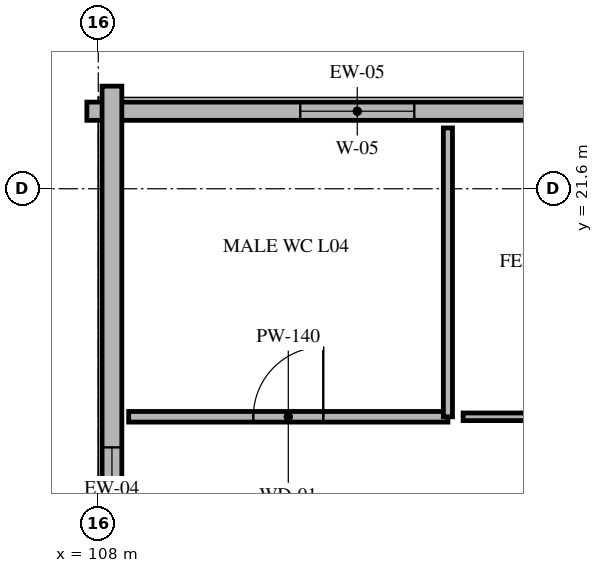
"""IFC4 building model, lengths in metres.
Left out: names, types, materials, properties, quantities, classifications, styles, units other than length and angle.
Written with IfcOpenShell. Run it as: python <this file> out.ifc"""

import sys

from ifc_helpers import new_model, si_unit, direction, frame, frame_2d, origin, place, context, subcontext, project, spatial, rectangle, extrude, element, fill, save


model = new_model("IFC4")
c1 = context("Model", 3, precision=1e-05, world=origin(), true_north=direction((0.0, 1.0)))
c2 = subcontext(c1, "Body", "Model", "MODEL_VIEW")
j1 = project(units=[si_unit("LENGTHUNIT", "METRE"), si_unit("PLANEANGLEUNIT", "RADIAN")], contexts=[c1])
p1 = place(None, origin())
s1 = spatial("IfcSite", under=j1, at=p1, CompositionType="ELEMENT")
p2 = place(p1, origin())
s2 = spatial("IfcBuilding", under=s1, at=p2, CompositionType="ELEMENT")
p3 = place(p2, frame((0.0, 0.0, 16.8)))
s3 = spatial("IfcBuildingStorey", under=s2, at=p3, CompositionType="ELEMENT", Elevation=16.8)
p4 = place(p3, frame((107.85, 22.62, 0.0), z_axis=(0.0, 0.0, 1.0), x_axis=(1.0, 0.0, 0.0)))
e1 = element("IfcWall", 1, at=p4, inside=s3, PredefinedType="SOLIDWALL", context=c2, shape_type="SweptSolid", body=[
    extrude(rectangle(XDim=7.115, YDim=0.24, at=frame_2d((3.558, 0.0))), origin(), (0.0, 0.0, 1.0), 3.68),
])
p5 = place(p4, frame((2.808, 0.0, 0.9)))
e2 = element("IfcOpeningElement", 2, at=p5, cuts=e1, PredefinedType="OPENING", context=c2, shape_type="SweptSolid", body=[
    extrude(rectangle(XDim=1.5, YDim=1.2, at=frame_2d((0.75, 0.6))), frame((0.0, 0.13, 0.0), z_axis=(0.0, -1.0, 0.0), x_axis=(1.0, 0.0, 0.0)), (0.0, 0.0, 1.0), 0.26),
])
p6 = place(p3, frame((108.18, 11.346, 0.0), z_axis=(0.0, 0.0, 1.0), x_axis=(0.0, 1.0, 0.0)))
e3 = element("IfcWall", 3, at=p6, inside=s3, PredefinedType="SOLIDWALL", context=c2, shape_type="SweptSolid", body=[
    extrude(rectangle(XDim=11.604, YDim=0.26, at=frame_2d((5.802, 0.0))), origin(), (0.0, 0.0, 1.0), 3.68),
])
p7 = place(p6, frame((4.752, 0.0, 0.9)))
e4 = element("IfcOpeningElement", 4, at=p7, cuts=e3, PredefinedType="OPENING", context=c2, shape_type="SweptSolid", body=[
    extrude(rectangle(XDim=2.1, YDim=1.35, at=frame_2d((1.05, 0.675))), frame((0.0, 0.14, 0.0), z_axis=(0.0, -1.0, 0.0), x_axis=(1.0, 0.0, 0.0)), (0.0, 0.0, 1.0), 0.28),
])
p8 = place(p3, frame((108.4, 18.6, 0.0), z_axis=(0.0, 0.0, 1.0), x_axis=(1.0, 0.0, 0.0)))
e5 = element("IfcWall", 5, at=p8, inside=s3, PredefinedType="PARTITIONING", context=c2, shape_type="SweptSolid", body=[
    extrude(rectangle(XDim=4.2, YDim=0.14, at=frame_2d((2.1, 0.0))), origin(), (0.0, 0.0, 1.0), 3.68),
])
p9 = place(p8, frame((1.64, 0.0, 0.0)))
e6 = element("IfcOpeningElement", 6, at=p9, cuts=e5, PredefinedType="OPENING", context=c2, shape_type="SweptSolid", body=[
    extrude(rectangle(XDim=0.92, YDim=2.1, at=frame_2d((0.46, 1.05))), frame((0.0, 0.08, 0.0), z_axis=(0.0, -1.0, 0.0), x_axis=(1.0, 0.0, 0.0)), (0.0, 0.0, 1.0), 0.16),
])
p10 = place(p3, frame((112.6, 18.6, 0.0), z_axis=(0.0, 0.0, 1.0), x_axis=(0.0, 1.0, 0.0)))
e7 = element("IfcWall", 7, at=p10, inside=s3, PredefinedType="PARTITIONING", context=c2, shape_type="SweptSolid", body=[
    extrude(rectangle(XDim=3.8, YDim=0.12, at=frame_2d((1.9, 0.0))), origin(), (0.0, 0.0, 1.0), 3.68),
])
p11 = place(p3, frame((112.8, 18.6, 0.0), z_axis=(0.0, 0.0, 1.0), x_axis=(1.0, 0.0, 0.0)))
e8 = element("IfcWall", 8, at=p11, inside=s3, PredefinedType="PARTITIONING", context=c2, shape_type="SweptSolid", body=[
    extrude(rectangle(XDim=3.05, YDim=0.1, at=frame_2d((1.525, 0.0))), origin(), (0.0, 0.0, 1.0), 2.88),
])
p12 = place(p11, frame((1.66, 0.0, 0.0)))
e9 = element("IfcOpeningElement", 9, at=p12, cuts=e8, PredefinedType="OPENING", context=c2, shape_type="SweptSolid", body=[
    extrude(rectangle(XDim=0.88, YDim=2.1, at=frame_2d((0.44, 1.05))), frame((0.0, 0.06, 0.0), z_axis=(0.0, -1.0, 0.0), x_axis=(1.0, 0.0, 0.0)), (0.0, 0.0, 1.0), 0.12),
])
p13 = place(p5, origin())
e10 = element("IfcWindow", 10, at=p13, inside=s3, PartitioningType="SINGLE_PANEL", PredefinedType="WINDOW", context=c2, shape_type="SweptSolid", body=[
    extrude(rectangle(XDim=1.5, YDim=1.2, at=frame_2d((0.75, 0.6))), frame((0.0, 0.03, 0.0), z_axis=(0.0, -1.0, 0.0), x_axis=(1.0, 0.0, 0.0)), (0.0, 0.0, 1.0), 0.06),
])
fill(e2, e10)
p14 = place(p7, origin())
e11 = element("IfcWindow", 11, at=p14, inside=s3, PartitioningType="SINGLE_PANEL", PredefinedType="WINDOW", context=c2, shape_type="SweptSolid", body=[
    extrude(rectangle(XDim=2.1, YDim=1.35, at=frame_2d((1.05, 0.675))), frame((0.0, 0.03, 0.0), z_axis=(0.0, -1.0, 0.0), x_axis=(1.0, 0.0, 0.0)), (0.0, 0.0, 1.0), 0.06),
])
fill(e4, e11)
p15 = place(p9, origin())
e12 = element("IfcDoor", 12, at=p15, inside=s3, OperationType="SINGLE_SWING_RIGHT", PredefinedType="DOOR", context=c2, shape_type="SweptSolid", body=[
    extrude(rectangle(XDim=0.92, YDim=2.1, at=frame_2d((0.46, 1.05))), frame((0.0, 0.025, 0.0), z_axis=(0.0, -1.0, 0.0), x_axis=(1.0, 0.0, 0.0)), (0.0, 0.0, 1.0), 0.05),
])
fill(e6, e12)
save(model, sys.argv[1])
